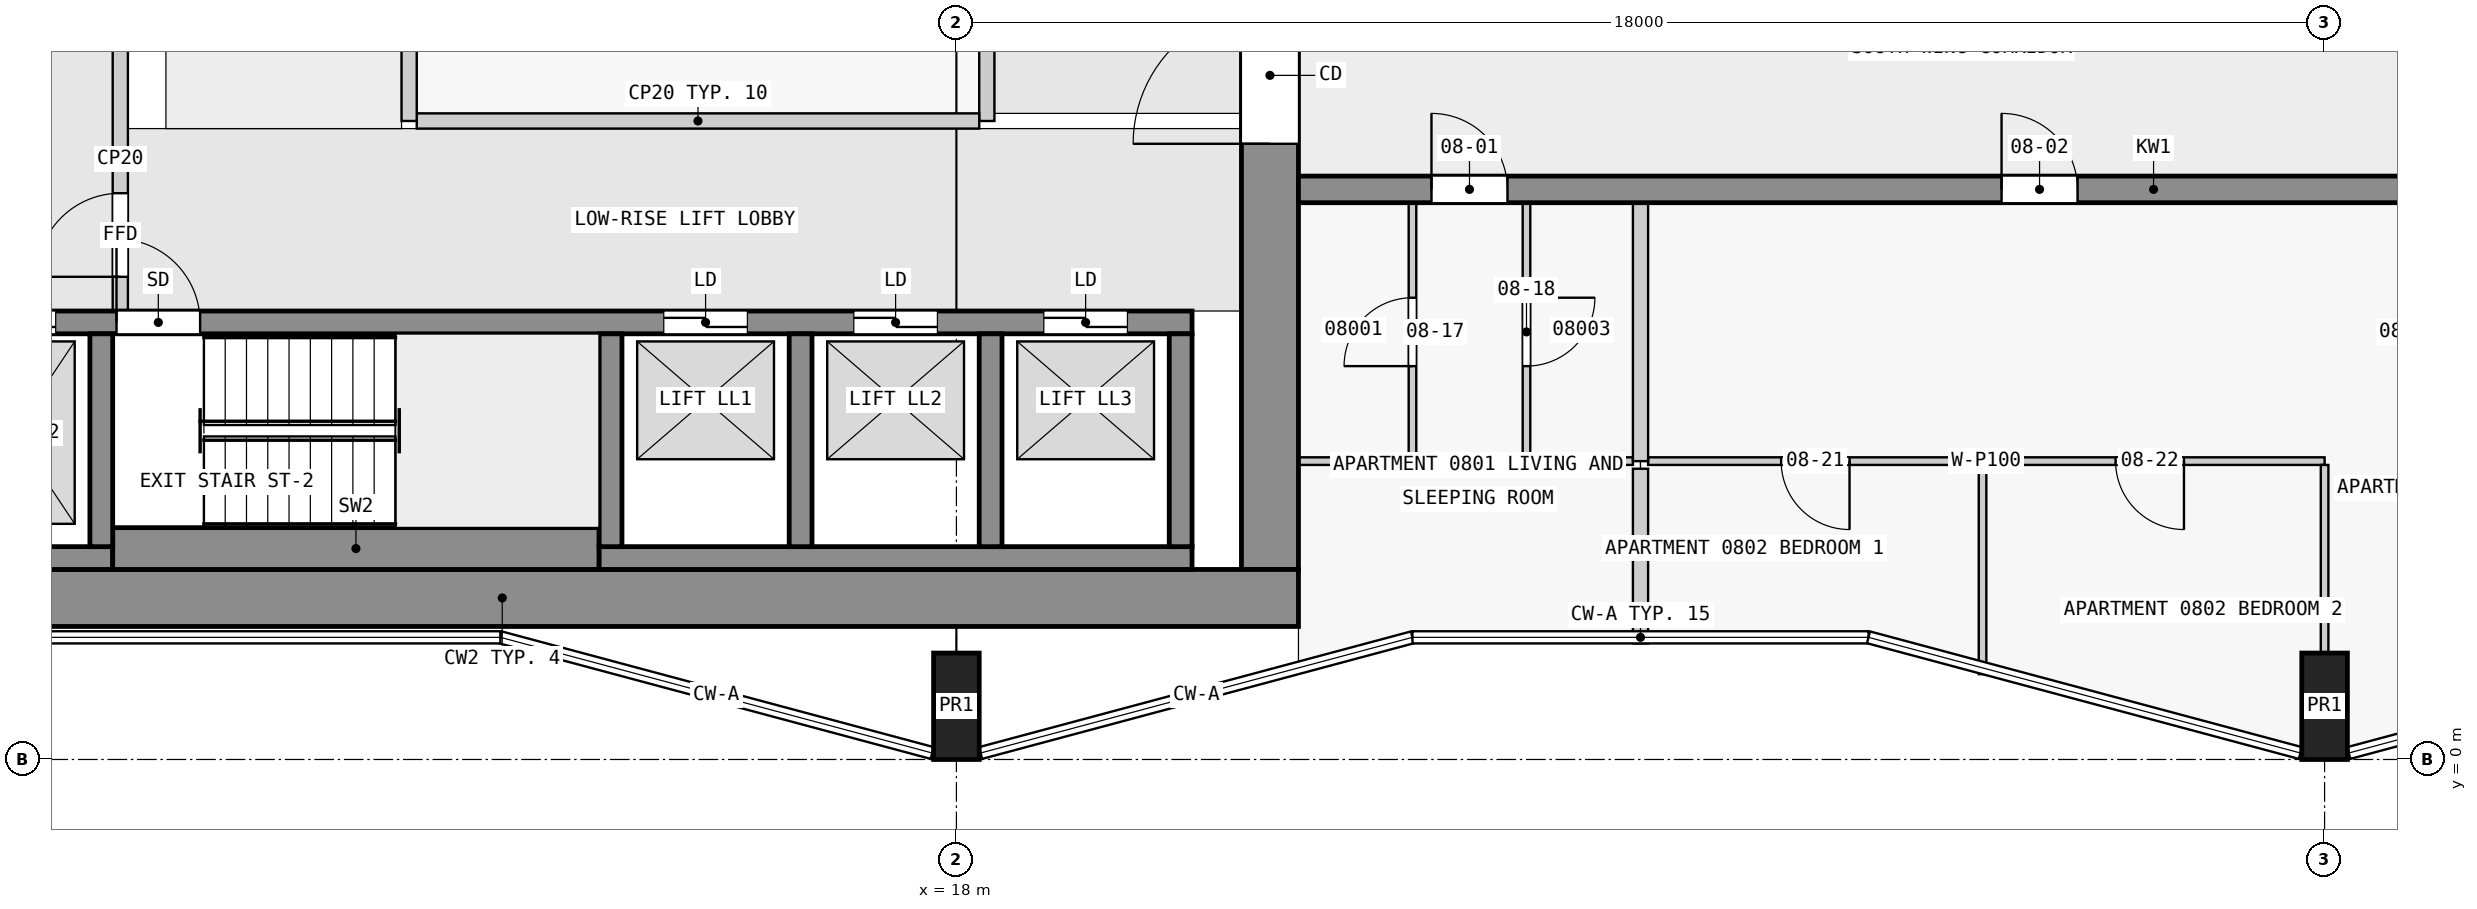
"""IFC4 building model, lengths in metres.
Left out: names, types, materials, properties, quantities, classifications, styles, units other than length and angle.
Written with IfcOpenShell. Run it as: python <this file> out.ifc"""

import sys

from ifc_helpers import new_model, si_unit, direction, frame, frame_2d, origin, origin_2d, place, context, subcontext, project, spatial, rectangle, extrude, element, fill, save


model = new_model("IFC4")
c1 = context("Model", 3, precision=1e-05, world=origin(), true_north=direction((0.0, 1.0)))
c2 = subcontext(c1, "Body", "Model", "MODEL_VIEW")
j1 = project(units=[si_unit("LENGTHUNIT", "METRE"), si_unit("PLANEANGLEUNIT", "RADIAN")], contexts=[c1])
p1 = place(None, origin())
s1 = spatial("IfcSite", under=j1, at=p1, CompositionType="ELEMENT")
p2 = place(p1, origin())
s2 = spatial("IfcBuilding", under=s1, at=p2, CompositionType="ELEMENT")
p3 = place(p2, frame((0.0, 0.0, 37.3)))
s3 = spatial("IfcBuildingStorey", under=s2, at=p3, CompositionType="ELEMENT", Elevation=37.3)
for number, where, z_axis, x_axis in (
    (1, (18.0, 0.7, 0.0), (0.0, 0.0, 1.0), (1.0, 0.0, 0.0)),
    (2, (36.0, 0.7, 0.0), (0.0, 0.0, 1.0), (1.0, 0.0, 0.0)),
):
    element("IfcColumn", number, at=place(p3, frame(where, z_axis=z_axis, x_axis=x_axis)), inside=s3, PredefinedType="COLUMN", context=c2, shape_type="SweptSolid", body=[
        extrude(rectangle(XDim=0.6, YDim=1.4, at=origin_2d()), origin(), (0.0, 0.0, 1.0), 3.5),
    ])
p4 = place(p3, frame((1.55, 2.125, 0.0), z_axis=(0.0, 0.0, 1.0), x_axis=(1.0, 0.0, 0.0)))
e3 = element("IfcWall", 3, at=p4, inside=s3, PredefinedType="SHEAR", context=c2, shape_type="SweptSolid", body=[
    extrude(rectangle(XDim=20.95, YDim=0.75, at=frame_2d((10.475, 0.0))), origin(), (0.0, 0.0, 1.0), 3.25),
])
p5 = place(p3, frame((22.125, 2.5, 0.0), z_axis=(0.0, 0.0, 1.0), x_axis=(0.0, 1.0, 0.0)))
e4 = element("IfcWall", 4, at=p5, inside=s3, PredefinedType="SHEAR", context=c2, shape_type="SweptSolid", body=[
    extrude(rectangle(XDim=14.75, YDim=0.75, at=frame_2d((7.375, 0.0))), origin(), (0.0, 0.0, 1.0), 3.25),
])
p6 = place(p5, frame((5.6, 0.0, 0.0)))
e5 = element("IfcOpeningElement", 5, at=p6, cuts=e4, PredefinedType="OPENING", context=c2, shape_type="SweptSolid", body=[
    extrude(rectangle(XDim=1.8, YDim=2.1, at=frame_2d((0.9, 1.05))), frame((0.0, 0.385, 0.0), z_axis=(0.0, -1.0, 0.0), x_axis=(1.0, 0.0, 0.0)), (0.0, 0.0, 1.0), 0.77),
])
p7 = place(p3, frame((2.3, 2.65, 0.0), z_axis=(0.0, 0.0, 1.0), x_axis=(1.0, 0.0, 0.0)))
e6 = element("IfcWall", 6, at=p7, inside=s3, PredefinedType="SHEAR", context=c2, shape_type="SweptSolid", body=[
    extrude(rectangle(XDim=4.6, YDim=0.3, at=frame_2d((2.3, 0.0))), origin(), (0.0, 0.0, 1.0), 3.25),
])
p8 = place(p3, frame((6.9, 2.775, 0.0), z_axis=(0.0, 0.0, 1.0), x_axis=(1.0, 0.0, 0.0)))
e7 = element("IfcWall", 7, at=p8, inside=s3, PredefinedType="SHEAR", context=c2, shape_type="SweptSolid", body=[
    extrude(rectangle(XDim=6.4, YDim=0.55, at=frame_2d((3.2, 0.0))), origin(), (0.0, 0.0, 1.0), 3.25),
])
p9 = place(p3, frame((13.3, 2.65, 0.0), z_axis=(0.0, 0.0, 1.0), x_axis=(1.0, 0.0, 0.0)))
e8 = element("IfcWall", 8, at=p9, inside=s3, PredefinedType="SHEAR", context=c2, shape_type="SweptSolid", body=[
    extrude(rectangle(XDim=7.8, YDim=0.3, at=frame_2d((3.9, 0.0))), origin(), (0.0, 0.0, 1.0), 3.25),
])
for number, where, z_axis, x_axis in (
    (9, (6.75, 2.8, 0.0), (0.0, 0.0, 1.0), (0.0, 1.0, 0.0)),
    (10, (13.45, 2.8, 0.0), (0.0, 0.0, 1.0), (0.0, 1.0, 0.0)),
    (11, (15.95, 2.8, 0.0), (0.0, 0.0, 1.0), (0.0, 1.0, 0.0)),
    (12, (18.45, 2.8, 0.0), (0.0, 0.0, 1.0), (0.0, 1.0, 0.0)),
    (13, (20.95, 2.8, 0.0), (0.0, 0.0, 1.0), (0.0, 1.0, 0.0)),
):
    element("IfcWall", number, at=place(p3, frame(where, z_axis=z_axis, x_axis=x_axis)), inside=s3, PredefinedType="SHEAR", context=c2, shape_type="SweptSolid", body=[
        extrude(rectangle(XDim=2.8, YDim=0.3, at=frame_2d((1.4, 0.0))), origin(), (0.0, 0.0, 1.0), 3.25),
    ])
p10 = place(p3, frame((2.3, 5.75, 0.0), z_axis=(0.0, 0.0, 1.0), x_axis=(1.0, 0.0, 0.0)))
e14 = element("IfcWall", 14, at=p10, inside=s3, PredefinedType="SHEAR", context=c2, shape_type="SweptSolid", body=[
    extrude(rectangle(XDim=18.8, YDim=0.3, at=frame_2d((9.4, 0.0))), origin(), (0.0, 0.0, 1.0), 3.25),
])
p11 = place(p10, frame((4.65, 0.0, 0.0)))
e15 = element("IfcOpeningElement", 15, at=p11, cuts=e14, PredefinedType="OPENING", context=c2, shape_type="SweptSolid", body=[
    extrude(rectangle(XDim=1.1, YDim=2.1, at=frame_2d((0.55, 1.05))), frame((0.0, 0.16, 0.0), z_axis=(0.0, -1.0, 0.0), x_axis=(1.0, 0.0, 0.0)), (0.0, 0.0, 1.0), 0.32),
])
p12 = place(p10, frame((0.45, 0.0, 0.0)))
e16 = element("IfcOpeningElement", 16, at=p12, cuts=e14, PredefinedType="OPENING", context=c2, shape_type="SweptSolid", body=[
    extrude(rectangle(XDim=1.1, YDim=2.1, at=frame_2d((0.55, 1.05))), frame((0.0, 0.16, 0.0), z_axis=(0.0, -1.0, 0.0), x_axis=(1.0, 0.0, 0.0)), (0.0, 0.0, 1.0), 0.32),
])
p13 = place(p10, frame((2.75, 0.0, 0.0)))
e17 = element("IfcOpeningElement", 17, at=p13, cuts=e14, PredefinedType="OPENING", context=c2, shape_type="SweptSolid", body=[
    extrude(rectangle(XDim=1.1, YDim=2.1, at=frame_2d((0.55, 1.05))), frame((0.0, 0.16, 0.0), z_axis=(0.0, -1.0, 0.0), x_axis=(1.0, 0.0, 0.0)), (0.0, 0.0, 1.0), 0.32),
])
p14 = place(p10, frame((11.85, 0.0, 0.0)))
e18 = element("IfcOpeningElement", 18, at=p14, cuts=e14, PredefinedType="OPENING", context=c2, shape_type="SweptSolid", body=[
    extrude(rectangle(XDim=1.1, YDim=2.1, at=frame_2d((0.55, 1.05))), frame((0.0, 0.16, 0.0), z_axis=(0.0, -1.0, 0.0), x_axis=(1.0, 0.0, 0.0)), (0.0, 0.0, 1.0), 0.32),
])
p15 = place(p10, frame((14.35, 0.0, 0.0)))
e19 = element("IfcOpeningElement", 19, at=p15, cuts=e14, PredefinedType="OPENING", context=c2, shape_type="SweptSolid", body=[
    extrude(rectangle(XDim=1.1, YDim=2.1, at=frame_2d((0.55, 1.05))), frame((0.0, 0.16, 0.0), z_axis=(0.0, -1.0, 0.0), x_axis=(1.0, 0.0, 0.0)), (0.0, 0.0, 1.0), 0.32),
])
p16 = place(p10, frame((16.85, 0.0, 0.0)))
e20 = element("IfcOpeningElement", 20, at=p16, cuts=e14, PredefinedType="OPENING", context=c2, shape_type="SweptSolid", body=[
    extrude(rectangle(XDim=1.1, YDim=2.1, at=frame_2d((0.55, 1.05))), frame((0.0, 0.16, 0.0), z_axis=(0.0, -1.0, 0.0), x_axis=(1.0, 0.0, 0.0)), (0.0, 0.0, 1.0), 0.32),
])
p17 = place(p3, frame((22.5, 7.5, 0.0), z_axis=(0.0, 0.0, 1.0), x_axis=(1.0, 0.0, 0.0)))
e21 = element("IfcWall", 21, at=p17, inside=s3, PredefinedType="SHEAR", context=c2, shape_type="SweptSolid", body=[
    extrude(rectangle(XDim=22.5, YDim=0.35, at=frame_2d((11.25, 0.0))), origin(), (0.0, 0.0, 1.0), 3.25),
])
p18 = place(p17, frame((1.75, 0.0, 0.0)))
e22 = element("IfcOpeningElement", 22, at=p18, cuts=e21, PredefinedType="OPENING", context=c2, shape_type="SweptSolid", body=[
    extrude(rectangle(XDim=1.0, YDim=2.1, at=frame_2d((0.5, 1.05))), frame((0.0, 0.185, 0.0), z_axis=(0.0, -1.0, 0.0), x_axis=(1.0, 0.0, 0.0)), (0.0, 0.0, 1.0), 0.37),
])
p19 = place(p17, frame((9.25, 0.0, 0.0)))
e23 = element("IfcOpeningElement", 23, at=p19, cuts=e21, PredefinedType="OPENING", context=c2, shape_type="SweptSolid", body=[
    extrude(rectangle(XDim=1.0, YDim=2.1, at=frame_2d((0.5, 1.05))), frame((0.0, 0.185, 0.0), z_axis=(0.0, -1.0, 0.0), x_axis=(1.0, 0.0, 0.0)), (0.0, 0.0, 1.0), 0.37),
])
p20 = place(p17, frame((18.75, 0.0, 0.0)))
e24 = element("IfcOpeningElement", 24, at=p20, cuts=e21, PredefinedType="OPENING", context=c2, shape_type="SweptSolid", body=[
    extrude(rectangle(XDim=0.9, YDim=2.1, at=frame_2d((0.45, 1.05))), frame((0.0, 0.185, 0.0), z_axis=(0.0, -1.0, 0.0), x_axis=(1.0, 0.0, 0.0)), (0.0, 0.0, 1.0), 0.37),
])
p21 = place(p17, frame((20.95, 0.0, 0.0)))
e25 = element("IfcOpeningElement", 25, at=p21, cuts=e21, PredefinedType="OPENING", context=c2, shape_type="SweptSolid", body=[
    extrude(rectangle(XDim=1.0, YDim=2.1, at=frame_2d((0.5, 1.05))), frame((0.0, 0.185, 0.0), z_axis=(0.0, -1.0, 0.0), x_axis=(1.0, 0.0, 0.0)), (0.0, 0.0, 1.0), 0.37),
])
p22 = place(p3, frame((7.0, 5.9, 0.0), z_axis=(0.0, 0.0, 1.0), x_axis=(0.0, 1.0, 0.0)))
e26 = element("IfcWall", 26, at=p22, inside=s3, PredefinedType="PARTITIONING", context=c2, shape_type="SweptSolid", body=[
    extrude(rectangle(XDim=4.0, YDim=0.2, at=frame_2d((2.0, 0.0))), origin(), (0.0, 0.0, 1.0), 3.25),
])
p23 = place(p22, frame((0.45, 0.0, 0.0)))
e27 = element("IfcOpeningElement", 27, at=p23, cuts=e26, PredefinedType="OPENING", context=c2, shape_type="SweptSolid", body=[
    extrude(rectangle(XDim=1.1, YDim=2.1, at=frame_2d((0.55, 1.05))), frame((0.0, 0.11, 0.0), z_axis=(0.0, -1.0, 0.0), x_axis=(1.0, 0.0, 0.0)), (0.0, 0.0, 1.0), 0.22),
])
p24 = place(p3, frame((10.8, 8.4, 0.0), z_axis=(0.0, 0.0, 1.0), x_axis=(0.0, 1.0, 0.0)))
e28 = element("IfcWall", 28, at=p24, inside=s3, PredefinedType="PARTITIONING", context=c2, shape_type="SweptSolid", body=[
    extrude(rectangle(XDim=6.2, YDim=0.2, at=frame_2d((3.1, 0.0))), origin(), (0.0, 0.0, 1.0), 3.25),
])
p25 = place(p3, frame((10.9, 8.4, 0.0), z_axis=(0.0, 0.0, 1.0), x_axis=(1.0, 0.0, 0.0)))
e29 = element("IfcWall", 29, at=p25, inside=s3, PredefinedType="PARTITIONING", context=c2, shape_type="SweptSolid", body=[
    extrude(rectangle(XDim=7.4, YDim=0.2, at=frame_2d((3.7, 0.0))), origin(), (0.0, 0.0, 1.0), 3.25),
])
p26 = place(p3, frame((18.4, 8.4, 0.0), z_axis=(0.0, 0.0, 1.0), x_axis=(0.0, 1.0, 0.0)))
e30 = element("IfcWall", 30, at=p26, inside=s3, PredefinedType="PARTITIONING", context=c2, shape_type="SweptSolid", body=[
    extrude(rectangle(XDim=6.2, YDim=0.2, at=frame_2d((3.1, 0.0))), origin(), (0.0, 0.0, 1.0), 3.25),
])
p27 = place(p26, frame((3.15, 0.0, 0.0)))
e31 = element("IfcOpeningElement", 31, at=p27, cuts=e30, PredefinedType="OPENING", context=c2, shape_type="SweptSolid", body=[
    extrude(rectangle(XDim=0.9, YDim=2.1, at=frame_2d((0.45, 1.05))), frame((0.0, 0.11, 0.0), z_axis=(0.0, -1.0, 0.0), x_axis=(1.0, 0.0, 0.0)), (0.0, 0.0, 1.0), 0.22),
])
p28 = place(p3, frame((36.0, 3.925, 0.0), z_axis=(0.0, 0.0, 1.0), x_axis=(-1.0, 0.0, 0.0)))
e32 = element("IfcWall", 32, at=p28, inside=s3, PredefinedType="PARTITIONING", context=c2, shape_type="SweptSolid", body=[
    extrude(rectangle(XDim=8.9, YDim=0.1, at=frame_2d((4.45, 0.0))), origin(), (0.0, 0.0, 1.0), 3.25),
])
p29 = place(p28, frame((6.25, 0.0, 0.0)))
e33 = element("IfcOpeningElement", 33, at=p29, cuts=e32, PredefinedType="OPENING", context=c2, shape_type="SweptSolid", body=[
    extrude(rectangle(XDim=0.9, YDim=2.1, at=frame_2d((0.45, 1.05))), frame((0.0, 0.06, 0.0), z_axis=(0.0, -1.0, 0.0), x_axis=(1.0, 0.0, 0.0)), (0.0, 0.0, 1.0), 0.12),
])
p30 = place(p28, frame((1.85, 0.0, 0.0)))
e34 = element("IfcOpeningElement", 34, at=p30, cuts=e32, PredefinedType="OPENING", context=c2, shape_type="SweptSolid", body=[
    extrude(rectangle(XDim=0.9, YDim=2.1, at=frame_2d((0.45, 1.05))), frame((0.0, 0.06, 0.0), z_axis=(0.0, -1.0, 0.0), x_axis=(1.0, 0.0, 0.0)), (0.0, 0.0, 1.0), 0.12),
])
p31 = place(p3, frame((22.5, 3.925, 0.0), z_axis=(0.0, 0.0, 1.0), x_axis=(1.0, 0.0, 0.0)))
e35 = element("IfcWall", 35, at=p31, inside=s3, PredefinedType="PARTITIONING", context=c2, shape_type="SweptSolid", body=[
    extrude(rectangle(XDim=1.45, YDim=0.1, at=frame_2d((0.725, 0.0))), origin(), (0.0, 0.0, 1.0), 3.25),
])
p32 = place(p3, frame((25.55, 3.925, 0.0), z_axis=(0.0, 0.0, 1.0), x_axis=(1.0, 0.0, 0.0)))
e36 = element("IfcWall", 36, at=p32, inside=s3, PredefinedType="PARTITIONING", context=c2, shape_type="SweptSolid", body=[
    extrude(rectangle(XDim=1.35, YDim=0.1, at=frame_2d((0.675, 0.0))), origin(), (0.0, 0.0, 1.0), 3.25),
])
p33 = place(p3, frame((24.0, 3.925, 0.0), z_axis=(0.0, 0.0, 1.0), x_axis=(0.0, 1.0, 0.0)))
e37 = element("IfcWall", 37, at=p33, inside=s3, PredefinedType="PARTITIONING", context=c2, shape_type="SweptSolid", body=[
    extrude(rectangle(XDim=3.4, YDim=0.1, at=frame_2d((1.7, 0.0))), origin(), (0.0, 0.0, 1.0), 3.25),
])
p34 = place(p33, frame((1.25, 0.0, 0.0)))
e38 = element("IfcOpeningElement", 38, at=p34, cuts=e37, PredefinedType="OPENING", context=c2, shape_type="SweptSolid", body=[
    extrude(rectangle(XDim=0.9, YDim=2.1, at=frame_2d((0.45, 1.05))), frame((0.0, 0.06, 0.0), z_axis=(0.0, -1.0, 0.0), x_axis=(1.0, 0.0, 0.0)), (0.0, 0.0, 1.0), 0.12),
])
p35 = place(p3, frame((25.5, 7.325, 0.0), z_axis=(0.0, 0.0, 1.0), x_axis=(0.0, -1.0, 0.0)))
e39 = element("IfcWall", 39, at=p35, inside=s3, PredefinedType="PARTITIONING", context=c2, shape_type="SweptSolid", body=[
    extrude(rectangle(XDim=3.4, YDim=0.1, at=frame_2d((1.7, 0.0))), origin(), (0.0, 0.0, 1.0), 3.25),
])
p36 = place(p35, frame((1.25, 0.0, 0.0)))
e40 = element("IfcOpeningElement", 40, at=p36, cuts=e39, PredefinedType="OPENING", context=c2, shape_type="SweptSolid", body=[
    extrude(rectangle(XDim=0.9, YDim=2.1, at=frame_2d((0.45, 1.05))), frame((0.0, 0.06, 0.0), z_axis=(0.0, -1.0, 0.0), x_axis=(1.0, 0.0, 0.0)), (0.0, 0.0, 1.0), 0.12),
])
p37 = place(p3, frame((27.0, 3.825, 0.0), z_axis=(0.0, 0.0, 1.0), x_axis=(0.0, -1.0, 0.0)))
e41 = element("IfcWall", 41, at=p37, inside=s3, PredefinedType="PARTITIONING", context=c2, shape_type="SweptSolid", body=[
    extrude(rectangle(XDim=2.298, YDim=0.2, at=frame_2d((1.149, 0.0))), origin(), (0.0, 0.0, 1.0), 3.25),
])
p38 = place(p3, frame((27.0, 3.925, 0.0), z_axis=(0.0, 0.0, 1.0), x_axis=(0.0, 1.0, 0.0)))
e42 = element("IfcWall", 42, at=p38, inside=s3, PredefinedType="PARTITIONING", context=c2, shape_type="SweptSolid", body=[
    extrude(rectangle(XDim=3.4, YDim=0.2, at=frame_2d((1.7, 0.0))), origin(), (0.0, 0.0, 1.0), 3.25),
])
p39 = place(p3, frame((31.5, 1.122, 0.0), z_axis=(0.0, 0.0, 1.0), x_axis=(0.0, 1.0, 0.0)))
e43 = element("IfcWall", 43, at=p39, inside=s3, PredefinedType="PARTITIONING", context=c2, shape_type="SweptSolid", body=[
    extrude(rectangle(XDim=2.753, YDim=0.1, at=frame_2d((1.376, 0.0))), origin(), (0.0, 0.0, 1.0), 3.25),
])
p40 = place(p3, frame((36.0, 1.4, 0.0), z_axis=(0.0, 0.0, 1.0), x_axis=(0.0, 1.0, 0.0)))
e44 = element("IfcWall", 44, at=p40, inside=s3, PredefinedType="PARTITIONING", context=c2, shape_type="SweptSolid", body=[
    extrude(rectangle(XDim=2.475, YDim=0.1, at=frame_2d((1.238, 0.0))), origin(), (0.0, 0.0, 1.0), 3.25),
])
p41 = place(p23, origin())
e45 = element("IfcDoor", 45, at=p41, inside=s3, OperationType="SINGLE_SWING_LEFT", PredefinedType="DOOR", context=c2, shape_type="SweptSolid", body=[
    extrude(rectangle(XDim=1.1, YDim=2.1, at=frame_2d((0.55, 1.05))), frame((0.0, 0.025, 0.0), z_axis=(0.0, -1.0, 0.0), x_axis=(1.0, 0.0, 0.0)), (0.0, 0.0, 1.0), 0.05),
])
fill(e27, e45)
p42 = place(p11, origin())
e46 = element("IfcDoor", 46, at=p42, inside=s3, OperationType="SINGLE_SWING_LEFT", PredefinedType="DOOR", context=c2, shape_type="SweptSolid", body=[
    extrude(rectangle(XDim=1.1, YDim=2.1, at=frame_2d((0.55, 1.05))), frame((0.0, 0.025, 0.0), z_axis=(0.0, -1.0, 0.0), x_axis=(1.0, 0.0, 0.0)), (0.0, 0.0, 1.0), 0.05),
])
fill(e15, e46)
p43 = place(p13, origin())
e47 = element("IfcDoor", 47, at=p43, inside=s3, OperationType="DOUBLE_DOOR_SLIDING", PredefinedType="DOOR", context=c2, shape_type="SweptSolid", body=[
    extrude(rectangle(XDim=1.1, YDim=2.1, at=frame_2d((0.55, 1.05))), frame((0.0, 0.025, 0.0), z_axis=(0.0, -1.0, 0.0), x_axis=(1.0, 0.0, 0.0)), (0.0, 0.0, 1.0), 0.05),
])
fill(e17, e47)
p44 = place(p14, origin())
e48 = element("IfcDoor", 48, at=p44, inside=s3, OperationType="DOUBLE_DOOR_SLIDING", PredefinedType="DOOR", context=c2, shape_type="SweptSolid", body=[
    extrude(rectangle(XDim=1.1, YDim=2.1, at=frame_2d((0.55, 1.05))), frame((0.0, 0.025, 0.0), z_axis=(0.0, -1.0, 0.0), x_axis=(1.0, 0.0, 0.0)), (0.0, 0.0, 1.0), 0.05),
])
fill(e18, e48)
p45 = place(p15, origin())
e49 = element("IfcDoor", 49, at=p45, inside=s3, OperationType="DOUBLE_DOOR_SLIDING", PredefinedType="DOOR", context=c2, shape_type="SweptSolid", body=[
    extrude(rectangle(XDim=1.1, YDim=2.1, at=frame_2d((0.55, 1.05))), frame((0.0, 0.025, 0.0), z_axis=(0.0, -1.0, 0.0), x_axis=(1.0, 0.0, 0.0)), (0.0, 0.0, 1.0), 0.05),
])
fill(e19, e49)
p46 = place(p16, origin())
e50 = element("IfcDoor", 50, at=p46, inside=s3, OperationType="DOUBLE_DOOR_SLIDING", PredefinedType="DOOR", context=c2, shape_type="SweptSolid", body=[
    extrude(rectangle(XDim=1.1, YDim=2.1, at=frame_2d((0.55, 1.05))), frame((0.0, 0.025, 0.0), z_axis=(0.0, -1.0, 0.0), x_axis=(1.0, 0.0, 0.0)), (0.0, 0.0, 1.0), 0.05),
])
fill(e20, e50)
p47 = place(p6, origin())
e51 = element("IfcDoor", 51, at=p47, inside=s3, OperationType="DOUBLE_DOOR_SINGLE_SWING", PredefinedType="DOOR", context=c2, shape_type="SweptSolid", body=[
    extrude(rectangle(XDim=1.8, YDim=2.1, at=frame_2d((0.9, 1.05))), frame((0.0, 0.025, 0.0), z_axis=(0.0, -1.0, 0.0), x_axis=(1.0, 0.0, 0.0)), (0.0, 0.0, 1.0), 0.05),
])
fill(e5, e51)
p48 = place(p18, origin())
e52 = element("IfcDoor", 52, at=p48, inside=s3, OperationType="SINGLE_SWING_LEFT", PredefinedType="DOOR", context=c2, shape_type="SweptSolid", body=[
    extrude(rectangle(XDim=1.0, YDim=2.1, at=frame_2d((0.5, 1.05))), frame((0.0, 0.025, 0.0), z_axis=(0.0, -1.0, 0.0), x_axis=(1.0, 0.0, 0.0)), (0.0, 0.0, 1.0), 0.05),
])
fill(e22, e52)
p49 = place(p19, origin())
e53 = element("IfcDoor", 53, at=p49, inside=s3, OperationType="SINGLE_SWING_LEFT", PredefinedType="DOOR", context=c2, shape_type="SweptSolid", body=[
    extrude(rectangle(XDim=1.0, YDim=2.1, at=frame_2d((0.5, 1.05))), frame((0.0, 0.025, 0.0), z_axis=(0.0, -1.0, 0.0), x_axis=(1.0, 0.0, 0.0)), (0.0, 0.0, 1.0), 0.05),
])
fill(e23, e53)
p50 = place(p34, origin())
e54 = element("IfcDoor", 54, at=p50, inside=s3, OperationType="SINGLE_SWING_LEFT", PredefinedType="DOOR", context=c2, shape_type="SweptSolid", body=[
    extrude(rectangle(XDim=0.9, YDim=2.1, at=frame_2d((0.45, 1.05))), frame((0.0, 0.025, 0.0), z_axis=(0.0, -1.0, 0.0), x_axis=(1.0, 0.0, 0.0)), (0.0, 0.0, 1.0), 0.05),
])
fill(e38, e54)
p51 = place(p36, origin())
e55 = element("IfcDoor", 55, at=p51, inside=s3, OperationType="SINGLE_SWING_LEFT", PredefinedType="DOOR", context=c2, shape_type="SweptSolid", body=[
    extrude(rectangle(XDim=0.9, YDim=2.1, at=frame_2d((0.45, 1.05))), frame((0.0, 0.025, 0.0), z_axis=(0.0, -1.0, 0.0), x_axis=(1.0, 0.0, 0.0)), (0.0, 0.0, 1.0), 0.05),
])
fill(e40, e55)
p52 = place(p29, origin())
e56 = element("IfcDoor", 56, at=p52, inside=s3, OperationType="SINGLE_SWING_RIGHT", PredefinedType="DOOR", context=c2, shape_type="SweptSolid", body=[
    extrude(rectangle(XDim=0.9, YDim=2.1, at=frame_2d((0.45, 1.05))), frame((0.0, 0.025, 0.0), z_axis=(0.0, -1.0, 0.0), x_axis=(1.0, 0.0, 0.0)), (0.0, 0.0, 1.0), 0.05),
])
fill(e33, e56)
p53 = place(p30, origin())
e57 = element("IfcDoor", 57, at=p53, inside=s3, OperationType="SINGLE_SWING_LEFT", PredefinedType="DOOR", context=c2, shape_type="SweptSolid", body=[
    extrude(rectangle(XDim=0.9, YDim=2.1, at=frame_2d((0.45, 1.05))), frame((0.0, 0.025, 0.0), z_axis=(0.0, -1.0, 0.0), x_axis=(1.0, 0.0, 0.0)), (0.0, 0.0, 1.0), 0.05),
])
fill(e34, e57)
save(model, sys.argv[1])
